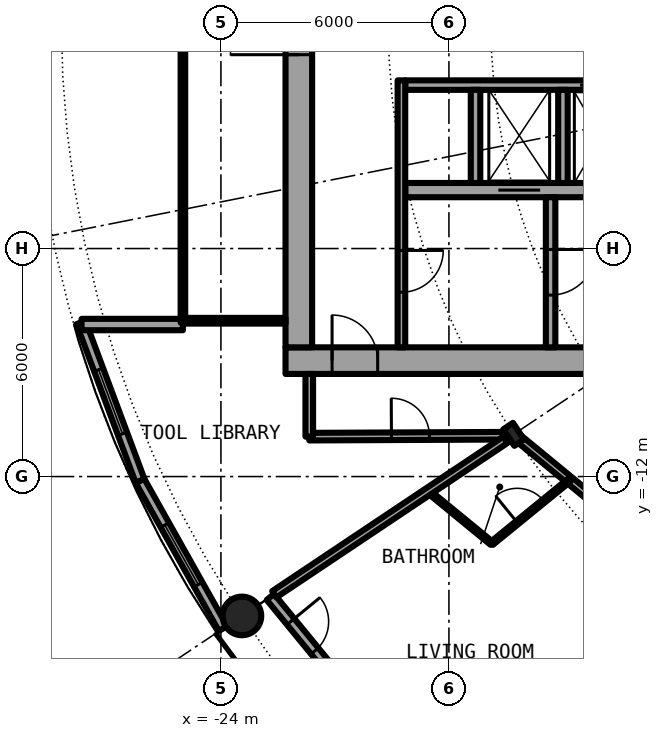
"""IFC4 building model, lengths in metres.
Left out: names, types, materials, properties, quantities, classifications, styles, units other than length and angle.
Written with IfcOpenShell. Run it as: python <this file> out.ifc"""

import sys

from ifc_helpers import new_model, si_unit, direction, frame, frame_2d, origin, origin_2d, place, context, subcontext, project, spatial, rectangle, hollow_circle, i_section, extrude, element, fill, save


model = new_model("IFC4")
c1 = context("Model", 3, precision=1e-05, world=origin(), true_north=direction((0.0, 1.0)))
c2 = subcontext(c1, "Body", "Model", "MODEL_VIEW")
j1 = project(units=[si_unit("LENGTHUNIT", "METRE"), si_unit("PLANEANGLEUNIT", "RADIAN")], contexts=[c1])
p1 = place(None, origin())
s1 = spatial("IfcSite", under=j1, at=p1, CompositionType="ELEMENT")
p2 = place(p1, origin())
s2 = spatial("IfcBuilding", under=s1, at=p2, CompositionType="ELEMENT")
p3 = place(p2, frame((0.0, 0.0, 69.7)))
s3 = spatial("IfcBuildingStorey", under=s2, at=p3, CompositionType="ELEMENT", Elevation=69.7)
p4 = place(p3, frame((-23.448, -15.667, 0.0), z_axis=(0.0, 0.0, 1.0), x_axis=(1.0, 0.0, 0.0)))
e1 = element("IfcColumn", 1, at=p4, inside=s3, PredefinedType="COLUMN", context=c2, shape_type="SweptSolid", body=[
    extrude(hollow_circle(Radius=0.508, WallThickness=0.04, at=origin_2d()), origin(), (0.0, 0.0, 1.0), 3.05),
])
p5 = place(p3, frame((-16.297, -10.889, 0.0), z_axis=(0.0, 0.0, 1.0), x_axis=(-0.831469612303, -0.55557023302, 0.0)))
e2 = element("IfcColumn", 2, at=p5, inside=s3, PredefinedType="COLUMN", context=c2, shape_type="SweptSolid", body=[
    extrude(i_section(OverallWidth=0.306, OverallDepth=0.524, WebThickness=0.021, FlangeThickness=0.04, FilletRadius=0.027, at=origin_2d()), origin(), (0.0, 0.0, 1.0), 3.05),
])
p6 = place(p3, frame((-22.699, -15.167, 0.0), z_axis=(0.0, 0.0, 1.0), x_axis=(0.634382322723, -0.773019449054, 0.0)))
e3 = element("IfcWall", 3, at=p6, inside=s3, PredefinedType="SOLIDWALL", context=c2, shape_type="SweptSolid", body=[
    extrude(rectangle(XDim=5.352, YDim=0.25, at=frame_2d((2.676, 0.0))), origin(), (0.0, 0.0, 1.0), 2.7),
])
p7 = place(p6, frame((0.841, 0.0, 0.0)))
e4 = element("IfcOpeningElement", 4, at=p7, cuts=e3, PredefinedType="OPENING", context=c2, shape_type="SweptSolid", body=[
    extrude(rectangle(XDim=1.0, YDim=2.2, at=frame_2d((0.5, 1.1))), frame((0.0, 0.135, 0.0), z_axis=(0.0, -1.0, 0.0), x_axis=(1.0, 0.0, 0.0)), (0.0, 0.0, 1.0), 0.27),
])
p8 = place(p6, frame((3.111, 0.0, 0.3)))
e5 = element("IfcOpeningElement", 5, at=p8, cuts=e3, PredefinedType="OPENING", context=c2, shape_type="SweptSolid", body=[
    extrude(rectangle(XDim=1.8, YDim=2.1, at=frame_2d((0.9, 1.05))), frame((0.0, 0.135, 0.0), z_axis=(0.0, -1.0, 0.0), x_axis=(1.0, 0.0, 0.0)), (0.0, 0.0, 1.0), 0.27),
])
p9 = place(p3, frame((-27.682, -7.945, 0.0), z_axis=(0.0, 0.0, 1.0), x_axis=(0.349247811493, -0.937030397675, 0.0)))
e6 = element("IfcWall", 6, at=p9, inside=s3, PredefinedType="SOLIDWALL", context=c2, shape_type="SweptSolid", body=[
    extrude(rectangle(XDim=4.452, YDim=0.25, at=frame_2d((2.226, 0.0))), origin(), (0.0, 0.0, 1.0), 2.7),
])
p10 = place(p9, frame((1.327, 0.0, 0.3)))
e7 = element("IfcOpeningElement", 7, at=p10, cuts=e6, PredefinedType="OPENING", context=c2, shape_type="SweptSolid", body=[
    extrude(rectangle(XDim=1.8, YDim=2.1, at=frame_2d((0.9, 1.05))), frame((0.0, 0.135, 0.0), z_axis=(0.0, -1.0, 0.0), x_axis=(1.0, 0.0, 0.0)), (0.0, 0.0, 1.0), 0.27),
])
p11 = place(p3, frame((-26.127, -12.117, 0.0), z_axis=(0.0, 0.0, 1.0), x_axis=(0.489696356642, -0.871893042919, 0.0)))
e8 = element("IfcWall", 8, at=p11, inside=s3, PredefinedType="SOLIDWALL", context=c2, shape_type="SweptSolid", body=[
    extrude(rectangle(XDim=4.454, YDim=0.25, at=frame_2d((2.227, 0.0))), origin(), (0.0, 0.0, 1.0), 2.7),
])
p12 = place(p11, frame((1.327, 0.0, 0.3)))
e9 = element("IfcOpeningElement", 9, at=p12, cuts=e8, PredefinedType="OPENING", context=c2, shape_type="SweptSolid", body=[
    extrude(rectangle(XDim=1.8, YDim=2.1, at=frame_2d((0.9, 1.05))), frame((0.0, 0.135, 0.0), z_axis=(0.0, -1.0, 0.0), x_axis=(1.0, 0.0, 0.0)), (0.0, 0.0, 1.0), 0.27),
])
p13 = place(p3, frame((-25.0, -8.0, 0.0), z_axis=(0.0, 0.0, 1.0), x_axis=(-1.0, 0.0, 0.0)))
e10 = element("IfcWall", 10, at=p13, inside=s3, PredefinedType="SOLIDWALL", context=c2, shape_type="SweptSolid", body=[
    extrude(rectangle(XDim=2.667, YDim=0.3, at=frame_2d((1.333, 0.0))), origin(), (0.0, 0.0, 1.0), 2.7),
])
p14 = place(p3, frame((-22.3, -8.95, 0.0), z_axis=(0.0, 0.0, 1.0), x_axis=(1.0, 0.0, 0.0)))
e11 = element("IfcWall", 11, at=p14, inside=s3, PredefinedType="SHEAR", context=c2, shape_type="SweptSolid", body=[
    extrude(rectangle(XDim=14.0, YDim=0.7, at=frame_2d((7.0, 0.0))), origin(), (0.0, 0.0, 1.0), 3.05),
])
p15 = place(p14, frame((1.225, 0.0, 0.0)))
e12 = element("IfcOpeningElement", 12, at=p15, cuts=e11, PredefinedType="OPENING", context=c2, shape_type="SweptSolid", body=[
    extrude(rectangle(XDim=1.2, YDim=2.3, at=frame_2d((0.6, 1.15))), frame((0.0, 0.36, 0.0), z_axis=(0.0, -1.0, 0.0), x_axis=(1.0, 0.0, 0.0)), (0.0, 0.0, 1.0), 0.72),
])
p16 = place(p3, frame((-21.95, -8.6, 0.0), z_axis=(0.0, 0.0, 1.0), x_axis=(0.0, 1.0, 0.0)))
e13 = element("IfcWall", 13, at=p16, inside=s3, PredefinedType="SHEAR", context=c2, shape_type="SweptSolid", body=[
    extrude(rectangle(XDim=17.2, YDim=0.7, at=frame_2d((8.6, 0.0))), origin(), (0.0, 0.0, 1.0), 3.05),
])
p17 = place(p16, frame((7.7, 0.0, 0.0)))
e14 = element("IfcOpeningElement", 14, at=p17, cuts=e13, PredefinedType="OPENING", context=c2, shape_type="SweptSolid", body=[
    extrude(rectangle(XDim=1.8, YDim=2.3, at=frame_2d((0.9, 1.15))), frame((0.0, 0.36, 0.0), z_axis=(0.0, -1.0, 0.0), x_axis=(1.0, 0.0, 0.0)), (0.0, 0.0, 1.0), 0.72),
])
p18 = place(p3, frame((-9.0, -1.7, 0.0), z_axis=(0.0, 0.0, 1.0), x_axis=(-1.0, 0.0, 0.0)))
e15 = element("IfcWall", 15, at=p18, inside=s3, PredefinedType="SHEAR", context=c2, shape_type="SweptSolid", body=[
    extrude(rectangle(XDim=10.15, YDim=0.25, at=frame_2d((5.075, 0.0))), origin(), (0.0, 0.0, 1.0), 3.05),
])
p19 = place(p18, frame((0.387, 0.0, 0.0)))
e16 = element("IfcOpeningElement", 16, at=p19, cuts=e15, PredefinedType="OPENING", context=c2, shape_type="SweptSolid", body=[
    extrude(rectangle(XDim=1.1, YDim=2.3, at=frame_2d((0.55, 1.15))), frame((0.0, 0.135, 0.0), z_axis=(0.0, -1.0, 0.0), x_axis=(1.0, 0.0, 0.0)), (0.0, 0.0, 1.0), 0.27),
])
p20 = place(p18, frame((2.45, 0.0, 0.0)))
e17 = element("IfcOpeningElement", 17, at=p20, cuts=e15, PredefinedType="OPENING", context=c2, shape_type="SweptSolid", body=[
    extrude(rectangle(XDim=1.1, YDim=2.3, at=frame_2d((0.55, 1.15))), frame((0.0, 0.135, 0.0), z_axis=(0.0, -1.0, 0.0), x_axis=(1.0, 0.0, 0.0)), (0.0, 0.0, 1.0), 0.27),
])
p21 = place(p18, frame((4.45, 0.0, 0.0)))
e18 = element("IfcOpeningElement", 18, at=p21, cuts=e15, PredefinedType="OPENING", context=c2, shape_type="SweptSolid", body=[
    extrude(rectangle(XDim=1.1, YDim=2.3, at=frame_2d((0.55, 1.15))), frame((0.0, 0.135, 0.0), z_axis=(0.0, -1.0, 0.0), x_axis=(1.0, 0.0, 0.0)), (0.0, 0.0, 1.0), 0.27),
])
p22 = place(p3, frame((-9.0, -4.462, 0.0), z_axis=(0.0, 0.0, 1.0), x_axis=(-1.0, 0.0, 0.0)))
e19 = element("IfcWall", 19, at=p22, inside=s3, PredefinedType="SHEAR", context=c2, shape_type="SweptSolid", body=[
    extrude(rectangle(XDim=10.15, YDim=0.375, at=frame_2d((5.075, 0.0))), origin(), (0.0, 0.0, 1.0), 3.05),
])
p23 = place(p22, frame((6.6, 0.0, 0.0)))
e20 = element("IfcOpeningElement", 20, at=p23, cuts=e19, PredefinedType="OPENING", context=c2, shape_type="SweptSolid", body=[
    extrude(rectangle(XDim=1.1, YDim=2.3, at=frame_2d((0.55, 1.15))), frame((0.0, 0.198, 0.0), z_axis=(0.0, -1.0, 0.0), x_axis=(1.0, 0.0, 0.0)), (0.0, 0.0, 1.0), 0.395),
])
p24 = place(p3, frame((-15.325, -4.65, 0.0), z_axis=(0.0, 0.0, 1.0), x_axis=(0.0, -1.0, 0.0)))
e21 = element("IfcWall", 21, at=p24, inside=s3, PredefinedType="SHEAR", context=c2, shape_type="SweptSolid", body=[
    extrude(rectangle(XDim=3.95, YDim=0.25, at=frame_2d((1.975, 0.0))), origin(), (0.0, 0.0, 1.0), 3.05),
])
p25 = place(p24, frame((1.375, 0.0, 0.0)))
e22 = element("IfcOpeningElement", 22, at=p25, cuts=e21, PredefinedType="OPENING", context=c2, shape_type="SweptSolid", body=[
    extrude(rectangle(XDim=1.2, YDim=2.3, at=frame_2d((0.6, 1.15))), frame((0.0, 0.135, 0.0), z_axis=(0.0, -1.0, 0.0), x_axis=(1.0, 0.0, 0.0)), (0.0, 0.0, 1.0), 0.27),
])
for number, where, z_axis, x_axis in (
    (23, (-15.0, -1.825, 0.0), (0.0, 0.0, 1.0), (0.0, -1.0, 0.0)),
    (24, (-17.3, -1.825, 0.0), (0.0, 0.0, 1.0), (0.0, -1.0, 0.0)),
):
    element("IfcWall", number, at=place(p3, frame(where, z_axis=z_axis, x_axis=x_axis)), inside=s3, PredefinedType="SOLIDWALL", context=c2, shape_type="SweptSolid", body=[
        extrude(rectangle(XDim=2.45, YDim=0.25, at=frame_2d((1.225, 0.0))), origin(), (0.0, 0.0, 1.0), 2.7),
    ])
p26 = place(p3, frame((-19.25, -1.575, 0.0), z_axis=(0.0, 0.0, 1.0), x_axis=(0.0, -1.0, 0.0)))
e25 = element("IfcWall", 25, at=p26, inside=s3, PredefinedType="SOLIDWALL", context=c2, shape_type="SweptSolid", body=[
    extrude(rectangle(XDim=7.025, YDim=0.2, at=frame_2d((3.513, 0.0))), origin(), (0.0, 0.0, 1.0), 2.7),
])
p27 = place(p26, frame((4.475, 0.0, 0.0)))
e26 = element("IfcOpeningElement", 26, at=p27, cuts=e25, PredefinedType="OPENING", context=c2, shape_type="SweptSolid", body=[
    extrude(rectangle(XDim=1.1, YDim=2.3, at=frame_2d((0.55, 1.15))), frame((0.0, 0.11, 0.0), z_axis=(0.0, -1.0, 0.0), x_axis=(1.0, 0.0, 0.0)), (0.0, 0.0, 1.0), 0.22),
])
p28 = place(p3, frame((-22.3, -7.9, 0.0), z_axis=(0.0, 0.0, 1.0), x_axis=(-1.0, 0.0, 0.0)))
e27 = element("IfcWall", 27, at=p28, inside=s3, PredefinedType="PARTITIONING", context=c2, shape_type="SweptSolid", body=[
    extrude(rectangle(XDim=2.64, YDim=0.15, at=frame_2d((1.32, 0.0))), origin(), (0.0, 0.0, 1.0), 2.7),
])
p29 = place(p3, frame((-25.0, 7.95, 0.0), z_axis=(0.0, 0.0, 1.0), x_axis=(0.0, -1.0, 0.0)))
e28 = element("IfcWall", 28, at=p29, inside=s3, PredefinedType="PARTITIONING", context=c2, shape_type="SweptSolid", body=[
    extrude(rectangle(XDim=15.9, YDim=0.12, at=frame_2d((7.95, 0.0))), origin(), (0.0, 0.0, 1.0), 2.7),
])
p30 = place(p29, frame((0.95, 0.0, 0.1)))
e29 = element("IfcOpeningElement", 29, at=p30, cuts=e28, PredefinedType="OPENING", context=c2, shape_type="SweptSolid", body=[
    extrude(rectangle(XDim=14.0, YDim=2.35, at=frame_2d((7.0, 1.175))), frame((0.0, 0.07, 0.0), z_axis=(0.0, -1.0, 0.0), x_axis=(1.0, 0.0, 0.0)), (0.0, 0.0, 1.0), 0.14),
])
p31 = place(p3, frame((-18.542, -12.389, 0.0), z_axis=(0.0, 0.0, 1.0), x_axis=(0.772948171844, -0.634469166818, 0.0)))
e30 = element("IfcWall", 30, at=p31, inside=s3, PredefinedType="PARTITIONING", context=c2, shape_type="SweptSolid", body=[
    extrude(rectangle(XDim=2.158, YDim=0.1, at=frame_2d((1.079, 0.0))), origin(), (0.0, 0.0, 1.0), 2.7),
])
p32 = place(p3, frame((-16.172, -10.99, 0.0), z_axis=(0.0, 0.0, 1.0), x_axis=(0.772669779479, -0.634808169355, 0.0)))
e31 = element("IfcWall", 31, at=p32, inside=s3, PredefinedType="PARTITIONING", context=c2, shape_type="SweptSolid", body=[
    extrude(rectangle(XDim=11.208, YDim=0.2, at=frame_2d((5.604, 0.0))), origin(), (0.0, 0.0, 1.0), 2.38),
])
p33 = place(p32, frame((3.135, 0.0, 0.0)))
e32 = element("IfcOpeningElement", 32, at=p33, cuts=e31, PredefinedType="OPENING", context=c2, shape_type="SweptSolid", body=[
    extrude(rectangle(XDim=1.0, YDim=2.3, at=frame_2d((0.5, 1.15))), frame((0.0, 0.11, 0.0), z_axis=(0.0, -1.0, 0.0), x_axis=(1.0, 0.0, 0.0)), (0.0, 0.0, 1.0), 0.22),
])
p34 = place(p3, frame((-21.675, -10.95, 0.0), z_axis=(0.0, 0.0, 1.0), x_axis=(0.999988944514, 0.004702217579, 0.0)))
e33 = element("IfcWall", 33, at=p34, inside=s3, PredefinedType="PARTITIONING", context=c2, shape_type="SweptSolid", body=[
    extrude(rectangle(XDim=5.088, YDim=0.2, at=frame_2d((2.544, 0.0))), origin(), (0.0, 0.0, 1.0), 2.7),
])
p35 = place(p34, frame((2.162, 0.0, 0.0)))
e34 = element("IfcOpeningElement", 34, at=p35, cuts=e33, PredefinedType="OPENING", context=c2, shape_type="SweptSolid", body=[
    extrude(rectangle(XDim=1.0, YDim=2.3, at=frame_2d((0.5, 1.15))), frame((0.0, 0.11, 0.0), z_axis=(0.0, -1.0, 0.0), x_axis=(1.0, 0.0, 0.0)), (0.0, 0.0, 1.0), 0.22),
])
p36 = place(p3, frame((-22.595, -15.097, 0.0), z_axis=(0.0, 0.0, 1.0), x_axis=(0.831505405283, 0.555516661303, 0.0)))
e35 = element("IfcWall", 35, at=p36, inside=s3, PredefinedType="PARTITIONING", context=c2, shape_type="SweptSolid", body=[
    extrude(rectangle(XDim=7.312, YDim=0.2, at=frame_2d((3.656, 0.0))), origin(), (0.0, 0.0, 1.0), 2.7),
])
p37 = place(p3, frame((-17.24, -21.007, 0.0), z_axis=(0.0, 0.0, 1.0), x_axis=(0.634396151441, 0.77300810024, 0.0)))
e36 = element("IfcWall", 36, at=p37, inside=s3, PredefinedType="PARTITIONING", context=c2, shape_type="SweptSolid", body=[
    extrude(rectangle(XDim=8.419, YDim=0.1, at=frame_2d((4.209, 0.0))), origin(), (0.0, 0.0, 1.0), 2.7),
])
p38 = place(p37, frame((6.679, 0.0, 0.0)))
e37 = element("IfcOpeningElement", 37, at=p38, cuts=e36, PredefinedType="OPENING", context=c2, shape_type="SweptSolid", body=[
    extrude(rectangle(XDim=0.9, YDim=2.3, at=frame_2d((0.45, 1.15))), frame((0.0, 0.06, 0.0), z_axis=(0.0, -1.0, 0.0), x_axis=(1.0, 0.0, 0.0)), (0.0, 0.0, 1.0), 0.12),
])
p39 = place(p37, frame((2.468, 0.0, 0.0)))
e38 = element("IfcOpeningElement", 38, at=p39, cuts=e36, PredefinedType="OPENING", context=c2, shape_type="SweptSolid", body=[
    extrude(rectangle(XDim=0.9, YDim=2.3, at=frame_2d((0.45, 1.15))), frame((0.0, 0.06, 0.0), z_axis=(0.0, -1.0, 0.0), x_axis=(1.0, 0.0, 0.0)), (0.0, 0.0, 1.0), 0.12),
])
p40 = place(p3, frame((-16.874, -13.758, 0.0), z_axis=(0.0, 0.0, 1.0), x_axis=(0.774979608522, 0.631986239072, 0.0)))
e39 = element("IfcWall", 39, at=p40, inside=s3, PredefinedType="PARTITIONING", context=c2, shape_type="SweptSolid", body=[
    extrude(rectangle(XDim=2.636, YDim=0.1, at=frame_2d((1.318, 0.0))), origin(), (0.0, 0.0, 1.0), 2.7),
])
p41 = place(p40, frame((0.868, 0.0, 0.0)))
e40 = element("IfcOpeningElement", 40, at=p41, cuts=e39, PredefinedType="OPENING", context=c2, shape_type="SweptSolid", body=[
    extrude(rectangle(XDim=0.9, YDim=2.3, at=frame_2d((0.45, 1.15))), frame((0.0, 0.06, 0.0), z_axis=(0.0, -1.0, 0.0), x_axis=(1.0, 0.0, 0.0)), (0.0, 0.0, 1.0), 0.12),
])
p42 = place(p3, frame((-21.675, -10.95, 0.0), z_axis=(0.0, 0.0, 1.0), x_axis=(0.0, 1.0, 0.0)))
e41 = element("IfcWall", 41, at=p42, inside=s3, PredefinedType="PARTITIONING", context=c2, shape_type="SweptSolid", body=[
    extrude(rectangle(XDim=1.65, YDim=0.2, at=frame_2d((0.825, 0.0))), origin(), (0.0, 0.0, 1.0), 2.7),
])
p43 = place(p7, origin())
e42 = element("IfcDoor", 42, at=p43, inside=s3, OperationType="SINGLE_SWING_LEFT", PredefinedType="DOOR", context=c2, shape_type="SweptSolid", body=[
    extrude(rectangle(XDim=1.0, YDim=2.2, at=frame_2d((0.5, 1.1))), frame((0.0, 0.025, 0.0), z_axis=(0.0, -1.0, 0.0), x_axis=(1.0, 0.0, 0.0)), (0.0, 0.0, 1.0), 0.05),
])
fill(e4, e42)
p44 = place(p10, origin())
e43 = element("IfcWindow", 43, at=p44, inside=s3, PartitioningType="SINGLE_PANEL", PredefinedType="WINDOW", context=c2, shape_type="SweptSolid", body=[
    extrude(rectangle(XDim=1.8, YDim=2.1, at=frame_2d((0.9, 1.05))), frame((0.0, 0.03, 0.0), z_axis=(0.0, -1.0, 0.0), x_axis=(1.0, 0.0, 0.0)), (0.0, 0.0, 1.0), 0.06),
])
fill(e7, e43)
p45 = place(p12, origin())
e44 = element("IfcWindow", 44, at=p45, inside=s3, PartitioningType="SINGLE_PANEL", PredefinedType="WINDOW", context=c2, shape_type="SweptSolid", body=[
    extrude(rectangle(XDim=1.8, YDim=2.1, at=frame_2d((0.9, 1.05))), frame((0.0, 0.03, 0.0), z_axis=(0.0, -1.0, 0.0), x_axis=(1.0, 0.0, 0.0)), (0.0, 0.0, 1.0), 0.06),
])
fill(e9, e44)
p46 = place(p21, origin())
e45 = element("IfcDoor", 45, at=p46, inside=s3, OperationType="DOUBLE_DOOR_SLIDING", PredefinedType="DOOR", context=c2, shape_type="SweptSolid", body=[
    extrude(rectangle(XDim=1.1, YDim=2.3, at=frame_2d((0.55, 1.15))), frame((0.0, 0.025, 0.0), z_axis=(0.0, -1.0, 0.0), x_axis=(1.0, 0.0, 0.0)), (0.0, 0.0, 1.0), 0.05),
])
fill(e18, e45)
p47 = place(p23, origin())
e46 = element("IfcDoor", 46, at=p47, inside=s3, OperationType="DOUBLE_DOOR_SLIDING", PredefinedType="DOOR", context=c2, shape_type="SweptSolid", body=[
    extrude(rectangle(XDim=1.1, YDim=2.3, at=frame_2d((0.55, 1.15))), frame((0.0, 0.025, 0.0), z_axis=(0.0, -1.0, 0.0), x_axis=(1.0, 0.0, 0.0)), (0.0, 0.0, 1.0), 0.05),
])
fill(e20, e46)
p48 = place(p25, origin())
e47 = element("IfcDoor", 47, at=p48, inside=s3, OperationType="SINGLE_SWING_LEFT", PredefinedType="DOOR", context=c2, shape_type="SweptSolid", body=[
    extrude(rectangle(XDim=1.2, YDim=2.3, at=frame_2d((0.6, 1.15))), frame((0.0, 0.025, 0.0), z_axis=(0.0, -1.0, 0.0), x_axis=(1.0, 0.0, 0.0)), (0.0, 0.0, 1.0), 0.05),
])
fill(e22, e47)
p49 = place(p27, origin())
e48 = element("IfcDoor", 48, at=p49, inside=s3, OperationType="SINGLE_SWING_LEFT", PredefinedType="DOOR", context=c2, shape_type="SweptSolid", body=[
    extrude(rectangle(XDim=1.1, YDim=2.3, at=frame_2d((0.55, 1.15))), frame((0.0, 0.025, 0.0), z_axis=(0.0, -1.0, 0.0), x_axis=(1.0, 0.0, 0.0)), (0.0, 0.0, 1.0), 0.05),
])
fill(e26, e48)
p50 = place(p15, origin())
e49 = element("IfcDoor", 49, at=p50, inside=s3, OperationType="SINGLE_SWING_RIGHT", PredefinedType="DOOR", context=c2, shape_type="SweptSolid", body=[
    extrude(rectangle(XDim=1.2, YDim=2.3, at=frame_2d((0.6, 1.15))), frame((0.0, 0.025, 0.0), z_axis=(0.0, -1.0, 0.0), x_axis=(1.0, 0.0, 0.0)), (0.0, 0.0, 1.0), 0.05),
])
fill(e12, e49)
p51 = place(p17, origin())
e50 = element("IfcDoor", 50, at=p51, inside=s3, OperationType="SINGLE_SWING_LEFT", PredefinedType="DOOR", context=c2, shape_type="SweptSolid", body=[
    extrude(rectangle(XDim=1.8, YDim=2.3, at=frame_2d((0.9, 1.15))), frame((0.0, 0.025, 0.0), z_axis=(0.0, -1.0, 0.0), x_axis=(1.0, 0.0, 0.0)), (0.0, 0.0, 1.0), 0.05),
])
fill(e14, e50)
p52 = place(p30, origin())
e51 = element("IfcWindow", 51, at=p52, inside=s3, PartitioningType="SINGLE_PANEL", PredefinedType="WINDOW", context=c2, shape_type="SweptSolid", body=[
    extrude(rectangle(XDim=14.0, YDim=2.35, at=frame_2d((7.0, 1.175))), frame((0.0, 0.03, 0.0), z_axis=(0.0, -1.0, 0.0), x_axis=(1.0, 0.0, 0.0)), (0.0, 0.0, 1.0), 0.06),
])
fill(e29, e51)
p53 = place(p41, origin())
e52 = element("IfcDoor", 52, at=p53, inside=s3, OperationType="SINGLE_SWING_LEFT", PredefinedType="DOOR", context=c2, shape_type="SweptSolid", body=[
    extrude(rectangle(XDim=0.9, YDim=2.3, at=frame_2d((0.45, 1.15))), frame((0.0, 0.025, 0.0), z_axis=(0.0, -1.0, 0.0), x_axis=(1.0, 0.0, 0.0)), (0.0, 0.0, 1.0), 0.05),
])
fill(e40, e52)
p54 = place(p35, origin())
e53 = element("IfcDoor", 53, at=p54, inside=s3, OperationType="SINGLE_SWING_RIGHT", PredefinedType="DOOR", context=c2, shape_type="SweptSolid", body=[
    extrude(rectangle(XDim=1.0, YDim=2.3, at=frame_2d((0.5, 1.15))), frame((0.0, 0.025, 0.0), z_axis=(0.0, -1.0, 0.0), x_axis=(1.0, 0.0, 0.0)), (0.0, 0.0, 1.0), 0.05),
])
fill(e34, e53)
save(model, sys.argv[1])
